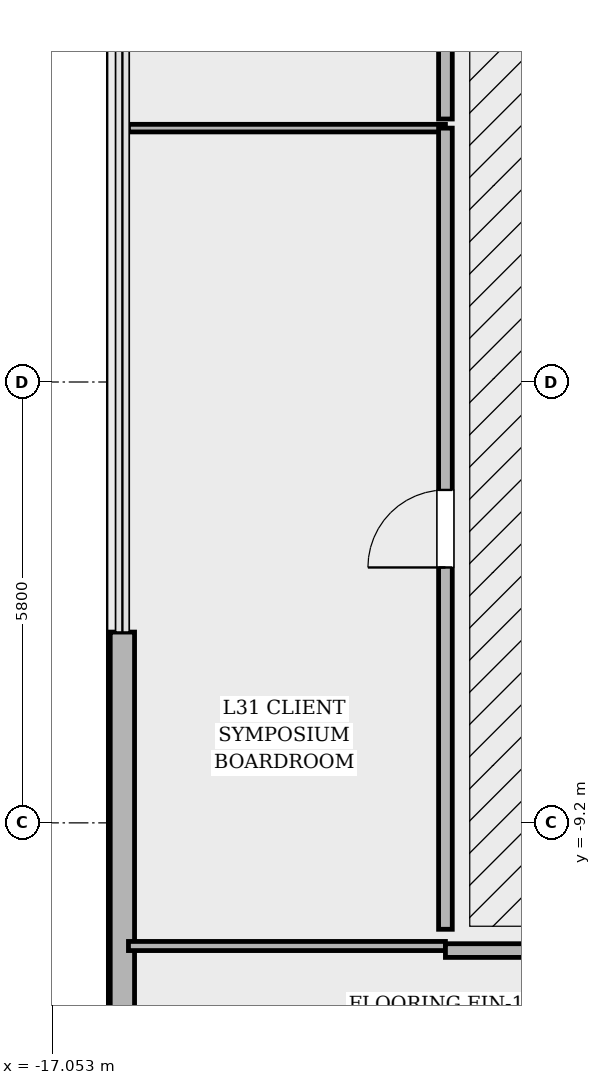
"""IFC4 building model, lengths in metres.
Left out: names, types, materials, properties, quantities, classifications, styles, units other than length and angle.
Written with IfcOpenShell. Run it as: python <this file> out.ifc"""

import sys

from ifc_helpers import new_model, si_unit, direction, frame, frame_2d, origin, place, context, subcontext, project, spatial, rectangle, extrude, element, fill, save


model = new_model("IFC4")
c1 = context("Model", 3, precision=1e-05, world=origin(), true_north=direction((0.0, 1.0)))
c2 = subcontext(c1, "Body", "Model", "MODEL_VIEW")
j1 = project(units=[si_unit("LENGTHUNIT", "METRE"), si_unit("PLANEANGLEUNIT", "RADIAN")], contexts=[c1])
p1 = place(None, origin())
s1 = spatial("IfcSite", under=j1, at=p1, CompositionType="ELEMENT")
p2 = place(p1, origin())
s2 = spatial("IfcBuilding", under=s1, at=p2, CompositionType="ELEMENT")
p3 = place(p2, frame((0.0, 0.0, 135.0)))
s3 = spatial("IfcBuildingStorey", under=s2, at=p3, CompositionType="ELEMENT", Elevation=135.0)
p4 = place(p3, frame((-16.13, -6.69, 0.0), z_axis=(0.0, 0.0, 1.0), x_axis=(0.0, -1.0, 0.0)))
e1 = element("IfcWall", 1, at=p4, inside=s3, PredefinedType="SOLIDWALL", context=c2, shape_type="SweptSolid", body=[
    extrude(rectangle(XDim=7.037, YDim=0.32, at=frame_2d((3.519, 0.0))), origin(), (0.0, 0.0, 1.0), 3.194),
])
p5 = place(p3, frame((-16.05, -10.82, 0.0), z_axis=(0.0, 0.0, 1.0), x_axis=(1.0, 0.0, 0.0)))
e2 = element("IfcWall", 2, at=p5, inside=s3, PredefinedType="PARTITIONING", context=c2, shape_type="SweptSolid", body=[
    extrude(rectangle(XDim=4.17, YDim=0.12, at=frame_2d((2.085, 0.0))), origin(), (0.0, 0.0, 1.0), 4.114),
])
p6 = place(p3, frame((-11.88, -10.88, 0.0), z_axis=(0.0, 0.0, 1.0), x_axis=(1.0, 0.0, 0.0)))
e3 = element("IfcWall", 3, at=p6, inside=s3, PredefinedType="PARTITIONING", context=c2, shape_type="SweptSolid", body=[
    extrude(rectangle(XDim=10.474, YDim=0.18, at=frame_2d((5.237, 0.0))), origin(), (0.0, 0.0, 1.0), 3.194),
])
p7 = place(p6, frame((4.712, 0.0, 0.0)))
e4 = element("IfcOpeningElement", 4, at=p7, cuts=e3, PredefinedType="OPENING", context=c2, shape_type="SweptSolid", body=[
    extrude(rectangle(XDim=1.05, YDim=2.2, at=frame_2d((0.525, 1.1))), frame((0.0, 0.1, 0.0), z_axis=(0.0, -1.0, 0.0), x_axis=(1.0, 0.0, 0.0)), (0.0, 0.0, 1.0), 0.2),
])
p8 = place(p3, frame((-16.05, -0.06, 0.0), z_axis=(0.0, 0.0, 1.0), x_axis=(1.0, 0.0, 0.0)))
e5 = element("IfcWall", 5, at=p8, inside=s3, PredefinedType="PARTITIONING", context=c2, shape_type="SweptSolid", body=[
    extrude(rectangle(XDim=4.17, YDim=0.1, at=frame_2d((2.085, 0.0))), origin(), (0.0, 0.0, 1.0), 4.52),
])
p9 = place(p3, frame((-11.88, -0.06, 0.0), z_axis=(0.0, 0.0, 1.0), x_axis=(0.0, -1.0, 0.0)))
e6 = element("IfcWall", 6, at=p9, inside=s3, PredefinedType="PARTITIONING", context=c2, shape_type="SweptSolid", body=[
    extrude(rectangle(XDim=10.54, YDim=0.18, at=frame_2d((5.27, 0.0))), origin(), (0.0, 0.0, 1.0), 3.194),
])
p10 = place(p9, frame((4.76, 0.0, 0.0)))
e7 = element("IfcOpeningElement", 7, at=p10, cuts=e6, PredefinedType="OPENING", context=c2, shape_type="SweptSolid", body=[
    extrude(rectangle(XDim=1.02, YDim=2.2, at=frame_2d((0.51, 1.1))), frame((0.0, 0.1, 0.0), z_axis=(0.0, -1.0, 0.0), x_axis=(1.0, 0.0, 0.0)), (0.0, 0.0, 1.0), 0.2),
])
p11 = place(p3, frame((-11.88, 10.6, 0.0), z_axis=(0.0, 0.0, 1.0), x_axis=(0.0, -1.0, 0.0)))
e8 = element("IfcWall", 8, at=p11, inside=s3, PredefinedType="PARTITIONING", context=c2, shape_type="SweptSolid", body=[
    extrude(rectangle(XDim=10.54, YDim=0.18, at=frame_2d((5.27, 0.0))), origin(), (0.0, 0.0, 1.0), 3.194),
])
p12 = place(p11, frame((4.76, 0.0, 0.0)))
e9 = element("IfcOpeningElement", 9, at=p12, cuts=e8, PredefinedType="OPENING", context=c2, shape_type="SweptSolid", body=[
    extrude(rectangle(XDim=1.02, YDim=2.2, at=frame_2d((0.51, 1.1))), frame((0.0, 0.1, 0.0), z_axis=(0.0, -1.0, 0.0), x_axis=(1.0, 0.0, 0.0)), (0.0, 0.0, 1.0), 0.2),
])
p13 = place(p10, origin())
e10 = element("IfcDoor", 10, at=p13, inside=s3, OperationType="SINGLE_SWING_RIGHT", PredefinedType="DOOR", context=c2, shape_type="SweptSolid", body=[
    extrude(rectangle(XDim=1.02, YDim=2.2, at=frame_2d((0.51, 1.1))), frame((0.0, 0.025, 0.0), z_axis=(0.0, -1.0, 0.0), x_axis=(1.0, 0.0, 0.0)), (0.0, 0.0, 1.0), 0.05),
])
fill(e7, e10)
save(model, sys.argv[1])
